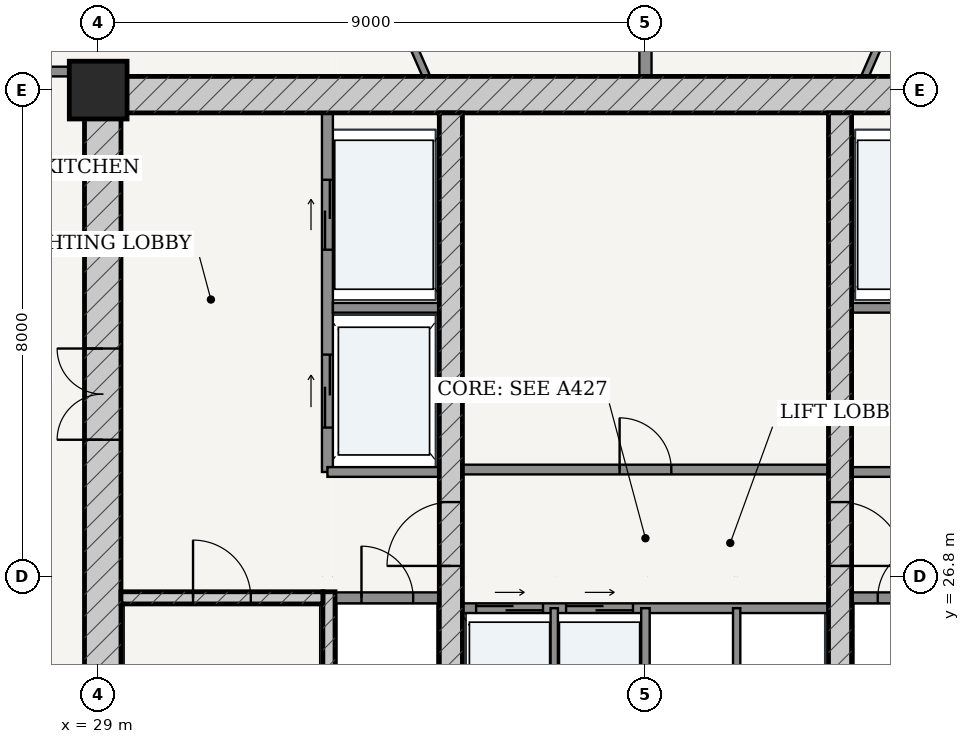
"""IFC4 building model, lengths in metres.
Left out: names, types, materials, properties, quantities, classifications, styles, units other than length and angle.
Written with IfcOpenShell. Run it as: python <this file> out.ifc"""

import sys

from ifc_helpers import new_model, si_unit, direction, frame, frame_2d, origin, origin_2d, place, context, subcontext, project, spatial, rectangle, extrude, source, transform, mapped, element, fill, save


model = new_model("IFC4")
c1 = context("Model", 3, precision=1e-05, world=origin(), true_north=direction((-0.2419218956, 0.970295726276)))
c2 = subcontext(c1, "Body", "Model", "MODEL_VIEW")
j1 = project(units=[si_unit("LENGTHUNIT", "METRE"), si_unit("PLANEANGLEUNIT", "RADIAN")], contexts=[c1])
p1 = place(None, origin())
s1 = spatial("IfcSite", under=j1, at=p1, CompositionType="ELEMENT")
p2 = place(p1, origin())
s2 = spatial("IfcBuilding", under=s1, at=p2, CompositionType="ELEMENT")
p3 = place(p2, frame((0.0, 0.0, 194.9)))
s3 = spatial("IfcBuildingStorey", under=s2, at=p3, CompositionType="ELEMENT", Elevation=194.9)
p4 = place(p3, frame((29.0, 34.8, 0.0), z_axis=(0.0, 0.0, 1.0), x_axis=(1.0, 0.0, 0.0)))
e1 = element("IfcColumn", 1, at=p4, inside=s3, PredefinedType="COLUMN", context=c2, shape_type="SweptSolid", body=[
    extrude(rectangle(XDim=0.95, YDim=0.95, at=origin_2d()), origin(), (0.0, 0.0, 1.0), 3.7),
])
p5 = place(p3, frame((28.775, 34.725, 0.0), z_axis=(0.0, 0.0, 1.0), x_axis=(1.0, 0.0, 0.0)))
e2 = element("IfcWall", 2, at=p5, inside=s3, PredefinedType="SHEAR", context=c2, shape_type="SweptSolid", body=[
    extrude(rectangle(XDim=18.45, YDim=0.6, at=frame_2d((9.225, 0.0))), origin(), (0.0, 0.0, 1.0), 3.435),
])
p6 = place(p3, frame((29.075, 19.175, 0.0), z_axis=(0.0, 0.0, 1.0), x_axis=(0.0, 1.0, 0.0)))
e3 = element("IfcWall", 3, at=p6, inside=s3, PredefinedType="SHEAR", context=c2, shape_type="SweptSolid", body=[
    extrude(rectangle(XDim=15.25, YDim=0.6, at=frame_2d((7.625, 0.0))), origin(), (0.0, 0.0, 1.0), 3.435),
])
p7 = place(p6, frame((9.875, 0.0, 0.0)))
e4 = element("IfcOpeningElement", 4, at=p7, cuts=e3, PredefinedType="OPENING", context=c2, shape_type="SweptSolid", body=[
    extrude(rectangle(XDim=1.5, YDim=2.2, at=frame_2d((0.75, 1.1))), frame((0.0, 0.31, 0.0), z_axis=(0.0, -1.0, 0.0), x_axis=(1.0, 0.0, 0.0)), (0.0, 0.0, 1.0), 0.62),
])
p8 = place(p3, frame((32.795, 19.175, 0.0), z_axis=(0.0, 0.0, 1.0), x_axis=(0.0, 1.0, 0.0)))
e5 = element("IfcWall", 5, at=p8, inside=s3, PredefinedType="SOLIDWALL", context=c2, shape_type="SweptSolid", body=[
    extrude(rectangle(XDim=7.375, YDim=0.2, at=frame_2d((3.688, 0.0))), origin(), (0.0, 0.0, 1.0), 3.435),
])
p9 = place(p3, frame((29.375, 26.45, 0.0), z_axis=(0.0, 0.0, 1.0), x_axis=(1.0, 0.0, 0.0)))
e6 = element("IfcWall", 6, at=p9, inside=s3, PredefinedType="SOLIDWALL", context=c2, shape_type="SweptSolid", body=[
    extrude(rectangle(XDim=3.32, YDim=0.2, at=frame_2d((1.66, 0.0))), origin(), (0.0, 0.0, 1.0), 3.435),
])
p10 = place(p9, frame((1.185, 0.0, 0.0)))
e7 = element("IfcOpeningElement", 7, at=p10, cuts=e6, PredefinedType="OPENING", context=c2, shape_type="SweptSolid", body=[
    extrude(rectangle(XDim=0.95, YDim=2.15, at=frame_2d((0.475, 1.075))), frame((0.0, 0.11, 0.0), z_axis=(0.0, -1.0, 0.0), x_axis=(1.0, 0.0, 0.0)), (0.0, 0.0, 1.0), 0.22),
])
p11 = place(p3, frame((34.8, 19.175, 0.0), z_axis=(0.0, 0.0, 1.0), x_axis=(0.0, 1.0, 0.0)))
e8 = element("IfcWall", 8, at=p11, inside=s3, PredefinedType="SHEAR", context=c2, shape_type="SweptSolid", body=[
    extrude(rectangle(XDim=15.25, YDim=0.38, at=frame_2d((7.625, 0.0))), origin(), (0.0, 0.0, 1.0), 3.435),
])
p12 = place(p11, frame((7.8, 0.0, 0.0)))
e9 = element("IfcOpeningElement", 9, at=p12, cuts=e8, PredefinedType="OPENING", context=c2, shape_type="SweptSolid", body=[
    extrude(rectangle(XDim=1.05, YDim=2.15, at=frame_2d((0.525, 1.075))), frame((0.0, 0.2, 0.0), z_axis=(0.0, -1.0, 0.0), x_axis=(1.0, 0.0, 0.0)), (0.0, 0.0, 1.0), 0.4),
])
p13 = place(p3, frame((41.2, 19.175, 0.0), z_axis=(0.0, 0.0, 1.0), x_axis=(0.0, 1.0, 0.0)))
e10 = element("IfcWall", 10, at=p13, inside=s3, PredefinedType="SHEAR", context=c2, shape_type="SweptSolid", body=[
    extrude(rectangle(XDim=15.25, YDim=0.38, at=frame_2d((7.625, 0.0))), origin(), (0.0, 0.0, 1.0), 3.435),
])
p14 = place(p13, frame((7.8, 0.0, 0.0)))
e11 = element("IfcOpeningElement", 11, at=p14, cuts=e10, PredefinedType="OPENING", context=c2, shape_type="SweptSolid", body=[
    extrude(rectangle(XDim=1.05, YDim=2.15, at=frame_2d((0.525, 1.075))), frame((0.0, 0.2, 0.0), z_axis=(0.0, -1.0, 0.0), x_axis=(1.0, 0.0, 0.0)), (0.0, 0.0, 1.0), 0.4),
])
p15 = place(p3, frame((32.9, 26.45, 0.0), z_axis=(0.0, 0.0, 1.0), x_axis=(1.0, 0.0, 0.0)))
e12 = element("IfcWall", 12, at=p15, inside=s3, PredefinedType="PARTITIONING", context=c2, shape_type="SweptSolid", body=[
    extrude(rectangle(XDim=1.71, YDim=0.18, at=frame_2d((0.855, 0.0))), origin(), (0.0, 0.0, 1.0), 3.435),
])
p16 = place(p15, frame((0.43, 0.0, 0.0)))
e13 = element("IfcOpeningElement", 13, at=p16, cuts=e12, PredefinedType="OPENING", context=c2, shape_type="SweptSolid", body=[
    extrude(rectangle(XDim=0.85, YDim=2.1, at=frame_2d((0.425, 1.05))), frame((0.0, 0.1, 0.0), z_axis=(0.0, -1.0, 0.0), x_axis=(1.0, 0.0, 0.0)), (0.0, 0.0, 1.0), 0.2),
])
p17 = place(p3, frame((41.39, 26.45, 0.0), z_axis=(0.0, 0.0, 1.0), x_axis=(1.0, 0.0, 0.0)))
e14 = element("IfcWall", 14, at=p17, inside=s3, PredefinedType="PARTITIONING", context=c2, shape_type="SweptSolid", body=[
    extrude(rectangle(XDim=1.71, YDim=0.18, at=frame_2d((0.855, 0.0))), origin(), (0.0, 0.0, 1.0), 3.435),
])
p18 = place(p17, frame((0.43, 0.0, 0.0)))
e15 = element("IfcOpeningElement", 15, at=p18, cuts=e14, PredefinedType="OPENING", context=c2, shape_type="SweptSolid", body=[
    extrude(rectangle(XDim=0.85, YDim=2.1, at=frame_2d((0.425, 1.05))), frame((0.0, 0.1, 0.0), z_axis=(0.0, -1.0, 0.0), x_axis=(1.0, 0.0, 0.0)), (0.0, 0.0, 1.0), 0.2),
])
p19 = place(p3, frame((32.77, 28.52, 0.0), z_axis=(0.0, 0.0, 1.0), x_axis=(0.0, 1.0, 0.0)))
e16 = element("IfcWall", 16, at=p19, inside=s3, PredefinedType="PARTITIONING", context=c2, shape_type="SweptSolid", body=[
    extrude(rectangle(XDim=5.905, YDim=0.18, at=frame_2d((2.953, 0.0))), origin(), (0.0, 0.0, 1.0), 3.435),
])
p20 = place(p19, frame((3.655, 0.0, 0.0)))
e17 = element("IfcOpeningElement", 17, at=p20, cuts=e16, PredefinedType="OPENING", context=c2, shape_type="SweptSolid", body=[
    extrude(rectangle(XDim=1.15, YDim=2.2, at=frame_2d((0.575, 1.1))), frame((0.0, 0.1, 0.0), z_axis=(0.0, -1.0, 0.0), x_axis=(1.0, 0.0, 0.0)), (0.0, 0.0, 1.0), 0.2),
])
p21 = place(p19, frame((0.73, 0.0, 0.0)))
e18 = element("IfcOpeningElement", 18, at=p21, cuts=e16, PredefinedType="OPENING", context=c2, shape_type="SweptSolid", body=[
    extrude(rectangle(XDim=1.2, YDim=2.25, at=frame_2d((0.6, 1.125))), frame((0.0, 0.1, 0.0), z_axis=(0.0, -1.0, 0.0), x_axis=(1.0, 0.0, 0.0)), (0.0, 0.0, 1.0), 0.2),
])
p22 = place(p3, frame((32.86, 31.22, 0.0), z_axis=(0.0, 0.0, 1.0), x_axis=(1.0, 0.0, 0.0)))
e19 = element("IfcWall", 19, at=p22, inside=s3, PredefinedType="PARTITIONING", context=c2, shape_type="SweptSolid", body=[
    extrude(rectangle(XDim=1.75, YDim=0.16, at=frame_2d((0.875, 0.0))), origin(), (0.0, 0.0, 1.0), 3.435),
])
p23 = place(p3, frame((32.77, 28.52, 0.0), z_axis=(0.0, 0.0, 1.0), x_axis=(1.0, 0.0, 0.0)))
e20 = element("IfcWall", 20, at=p23, inside=s3, PredefinedType="PARTITIONING", context=c2, shape_type="SweptSolid", body=[
    extrude(rectangle(XDim=1.84, YDim=0.16, at=frame_2d((0.92, 0.0))), origin(), (0.0, 0.0, 1.0), 3.435),
])
p24 = place(p3, frame((41.39, 31.22, 0.0), z_axis=(0.0, 0.0, 1.0), x_axis=(1.0, 0.0, 0.0)))
e21 = element("IfcWall", 21, at=p24, inside=s3, PredefinedType="PARTITIONING", context=c2, shape_type="SweptSolid", body=[
    extrude(rectangle(XDim=1.75, YDim=0.16, at=frame_2d((0.875, 0.0))), origin(), (0.0, 0.0, 1.0), 3.435),
])
p25 = place(p3, frame((41.39, 28.52, 0.0), z_axis=(0.0, 0.0, 1.0), x_axis=(1.0, 0.0, 0.0)))
e22 = element("IfcWall", 22, at=p25, inside=s3, PredefinedType="PARTITIONING", context=c2, shape_type="SweptSolid", body=[
    extrude(rectangle(XDim=1.84, YDim=0.16, at=frame_2d((0.92, 0.0))), origin(), (0.0, 0.0, 1.0), 3.435),
])
p26 = place(p3, frame((34.99, 28.56, 0.0), z_axis=(0.0, 0.0, 1.0), x_axis=(1.0, 0.0, 0.0)))
e23 = element("IfcWall", 23, at=p26, inside=s3, PredefinedType="PARTITIONING", context=c2, shape_type="SweptSolid", body=[
    extrude(rectangle(XDim=6.02, YDim=0.16, at=frame_2d((3.01, 0.0))), origin(), (0.0, 0.0, 1.0), 3.435),
])
p27 = place(p26, frame((2.585, 0.0, 0.0)))
e24 = element("IfcOpeningElement", 24, at=p27, cuts=e23, PredefinedType="OPENING", context=c2, shape_type="SweptSolid", body=[
    extrude(rectangle(XDim=0.85, YDim=2.1, at=frame_2d((0.425, 1.05))), frame((0.0, 0.09, 0.0), z_axis=(0.0, -1.0, 0.0), x_axis=(1.0, 0.0, 0.0)), (0.0, 0.0, 1.0), 0.18),
])
p28 = place(p3, frame((34.99, 26.28, 0.0), z_axis=(0.0, 0.0, 1.0), x_axis=(1.0, 0.0, 0.0)))
e25 = element("IfcWall", 25, at=p28, inside=s3, PredefinedType="PARTITIONING", context=c2, shape_type="SweptSolid", body=[
    extrude(rectangle(XDim=6.02, YDim=0.16, at=frame_2d((3.01, 0.0))), origin(), (0.0, 0.0, 1.0), 3.435),
])
p29 = place(p28, frame((0.225, 0.0, 0.0)))
e26 = element("IfcOpeningElement", 26, at=p29, cuts=e25, PredefinedType="OPENING", context=c2, shape_type="SweptSolid", body=[
    extrude(rectangle(XDim=1.1, YDim=2.2, at=frame_2d((0.55, 1.1))), frame((0.0, 0.09, 0.0), z_axis=(0.0, -1.0, 0.0), x_axis=(1.0, 0.0, 0.0)), (0.0, 0.0, 1.0), 0.18),
])
p30 = place(p28, frame((1.705, 0.0, 0.0)))
e27 = element("IfcOpeningElement", 27, at=p30, cuts=e25, PredefinedType="OPENING", context=c2, shape_type="SweptSolid", body=[
    extrude(rectangle(XDim=1.1, YDim=2.2, at=frame_2d((0.55, 1.1))), frame((0.0, 0.09, 0.0), z_axis=(0.0, -1.0, 0.0), x_axis=(1.0, 0.0, 0.0)), (0.0, 0.0, 1.0), 0.18),
])
p31 = place(p3, frame((36.5, 23.72, 0.0), z_axis=(0.0, 0.0, 1.0), x_axis=(0.0, 1.0, 0.0)))
e28 = element("IfcWall", 28, at=p31, inside=s3, PredefinedType="PARTITIONING", context=c2, shape_type="SweptSolid", body=[
    extrude(rectangle(XDim=2.56, YDim=0.12, at=frame_2d((1.28, 0.0))), origin(), (0.0, 0.0, 1.0), 3.435),
])
p32 = place(p3, frame((38.0, 23.72, 0.0), z_axis=(0.0, 0.0, 1.0), x_axis=(0.0, 1.0, 0.0)))
e29 = element("IfcWall", 29, at=p32, inside=s3, PredefinedType="PARTITIONING", context=c2, shape_type="SweptSolid", body=[
    extrude(rectangle(XDim=2.56, YDim=0.14, at=frame_2d((1.28, 0.0))), origin(), (0.0, 0.0, 1.0), 3.435),
])
p33 = place(p3, frame((39.5, 23.72, 0.0), z_axis=(0.0, 0.0, 1.0), x_axis=(0.0, 1.0, 0.0)))
e30 = element("IfcWall", 30, at=p33, inside=s3, PredefinedType="PARTITIONING", context=c2, shape_type="SweptSolid", body=[
    extrude(rectangle(XDim=2.56, YDim=0.12, at=frame_2d((1.28, 0.0))), origin(), (0.0, 0.0, 1.0), 3.435),
])
p34 = place(p3, frame((26.845, 35.105, 0.0), z_axis=(0.0, 0.0, 1.0), x_axis=(1.0, 0.0, 0.0)))
e31 = element("IfcWall", 31, at=p34, inside=s3, PredefinedType="PARTITIONING", context=c2, shape_type="SweptSolid", body=[
    extrude(rectangle(XDim=1.93, YDim=0.16, at=frame_2d((0.965, 0.0))), origin(), (0.0, 0.0, 1.0), 3.435),
])
p35 = place(p34, frame((0.37, 0.0, 0.0)))
e32 = element("IfcOpeningElement", 32, at=p35, cuts=e31, PredefinedType="OPENING", context=c2, shape_type="SweptSolid", body=[
    extrude(rectangle(XDim=0.98, YDim=2.2, at=frame_2d((0.49, 1.1))), frame((0.0, 0.09, 0.0), z_axis=(0.0, -1.0, 0.0), x_axis=(1.0, 0.0, 0.0)), (0.0, 0.0, 1.0), 0.18),
])
p36 = place(p3, frame((41.61, 35.027, 0.0), z_axis=(0.0, 0.0, 1.0), x_axis=(0.401859508224, 0.915701335398, 0.0)))
e33 = element("IfcWall", 33, at=p36, inside=s3, PredefinedType="PARTITIONING", context=c2, shape_type="SweptSolid", body=[
    extrude(rectangle(XDim=2.83, YDim=0.12, at=frame_2d((1.415, 0.0))), origin(), (0.0, 0.0, 1.0), 3.435),
])
p37 = place(p36, frame((0.965, 0.0, 0.0)))
e34 = element("IfcOpeningElement", 34, at=p37, cuts=e33, PredefinedType="OPENING", context=c2, shape_type="SweptSolid", body=[
    extrude(rectangle(XDim=0.9, YDim=2.15, at=frame_2d((0.45, 1.075))), frame((0.0, 0.07, 0.0), z_axis=(0.0, -1.0, 0.0), x_axis=(1.0, 0.0, 0.0)), (0.0, 0.0, 1.0), 0.14),
])
p38 = place(p3, frame((38.0, 35.027, 0.0), z_axis=(0.0, 0.0, 1.0), x_axis=(0.0, 1.0, 0.0)))
e35 = element("IfcWall", 35, at=p38, inside=s3, PredefinedType="PARTITIONING", context=c2, shape_type="SweptSolid", body=[
    extrude(rectangle(XDim=11.413, YDim=0.2, at=frame_2d((5.707, 0.0))), origin(), (0.0, 0.0, 1.0), 2.52),
])
p39 = place(p3, frame((34.397, 35.027, 0.0), z_axis=(0.0, 0.0, 1.0), x_axis=(-0.401135725485, 0.916018629581, 0.0)))
e36 = element("IfcWall", 36, at=p39, inside=s3, PredefinedType="PARTITIONING", context=c2, shape_type="SweptSolid", body=[
    extrude(rectangle(XDim=2.829, YDim=0.12, at=frame_2d((1.415, 0.0))), origin(), (0.0, 0.0, 1.0), 3.435),
])
p40 = place(p39, frame((0.985, 0.0, 0.0)))
e37 = element("IfcOpeningElement", 37, at=p40, cuts=e36, PredefinedType="OPENING", context=c2, shape_type="SweptSolid", body=[
    extrude(rectangle(XDim=0.86, YDim=2.15, at=frame_2d((0.43, 1.075))), frame((0.0, 0.07, 0.0), z_axis=(0.0, -1.0, 0.0), x_axis=(1.0, 0.0, 0.0)), (0.0, 0.0, 1.0), 0.14),
])
m1 = source(origin(), c2, "Body", "SweptSolid", [
    extrude(rectangle(XDim=1.5, YDim=2.2, at=frame_2d((0.75, 1.1))), frame((0.0, 0.025, 0.0), z_axis=(0.0, -1.0, 0.0), x_axis=(1.0, 0.0, 0.0)), (0.0, 0.0, 1.0), 0.05),
])
p41 = place(p7, origin())
e38 = element("IfcDoor", 38, at=p41, inside=s3, OperationType="DOUBLE_DOOR_SINGLE_SWING", PredefinedType="DOOR", context=c2, shape_type="MappedRepresentation", body=[
    mapped(m1, transform((0.0, 0.0, 0.0), scale=1.0)),
])
fill(e4, e38)
m2 = source(origin(), c2, "Body", "SweptSolid", [
    extrude(rectangle(XDim=1.05, YDim=2.15, at=frame_2d((0.525, 1.075))), frame((0.0, 0.025, 0.0), z_axis=(0.0, -1.0, 0.0), x_axis=(1.0, 0.0, 0.0)), (0.0, 0.0, 1.0), 0.05),
])
p42 = place(p12, origin())
e39 = element("IfcDoor", 39, at=p42, inside=s3, OperationType="SINGLE_SWING_LEFT", PredefinedType="DOOR", context=c2, shape_type="MappedRepresentation", body=[
    mapped(m2, transform((0.0, 0.0, 0.0), scale=1.0)),
])
fill(e9, e39)
p43 = place(p14, frame((1.05, 0.0, 0.0), z_axis=(0.0, 0.0, 1.0), x_axis=(-1.0, 0.0, 0.0)))
e40 = element("IfcDoor", 40, at=p43, inside=s3, OperationType="SINGLE_SWING_RIGHT", PredefinedType="DOOR", context=c2, shape_type="MappedRepresentation", body=[
    mapped(m2, transform((0.0, 0.0, 0.0), scale=1.0)),
])
fill(e11, e40)
m3 = source(origin(), c2, "Body", "SweptSolid", [
    extrude(rectangle(XDim=0.95, YDim=2.15, at=frame_2d((0.475, 1.075))), frame((0.0, 0.025, 0.0), z_axis=(0.0, -1.0, 0.0), x_axis=(1.0, 0.0, 0.0)), (0.0, 0.0, 1.0), 0.05),
])
p44 = place(p10, origin())
e41 = element("IfcDoor", 41, at=p44, inside=s3, OperationType="SINGLE_SWING_LEFT", PredefinedType="DOOR", context=c2, shape_type="MappedRepresentation", body=[
    mapped(m3, transform((0.0, 0.0, 0.0), scale=1.0)),
])
fill(e7, e41)
m4 = source(origin(), c2, "Body", "SweptSolid", [
    extrude(rectangle(XDim=0.85, YDim=2.1, at=frame_2d((0.425, 1.05))), frame((0.0, 0.025, 0.0), z_axis=(0.0, -1.0, 0.0), x_axis=(1.0, 0.0, 0.0)), (0.0, 0.0, 1.0), 0.05),
])
p45 = place(p16, origin())
e42 = element("IfcDoor", 42, at=p45, inside=s3, OperationType="SINGLE_SWING_LEFT", PredefinedType="DOOR", context=c2, shape_type="MappedRepresentation", body=[
    mapped(m4, transform((0.0, 0.0, 0.0), scale=1.0)),
])
fill(e13, e42)
p46 = place(p18, origin())
e43 = element("IfcDoor", 43, at=p46, inside=s3, OperationType="SINGLE_SWING_RIGHT", PredefinedType="DOOR", context=c2, shape_type="MappedRepresentation", body=[
    mapped(m4, transform((0.0, 0.0, 0.0), scale=1.0)),
])
fill(e15, e43)
p47 = place(p27, origin())
e44 = element("IfcDoor", 44, at=p47, inside=s3, OperationType="SINGLE_SWING_LEFT", PredefinedType="DOOR", context=c2, shape_type="MappedRepresentation", body=[
    mapped(m4, transform((0.0, 0.0, 0.0), scale=1.0)),
])
fill(e24, e44)
m5 = source(origin(), c2, "Body", "SweptSolid", [
    extrude(rectangle(XDim=1.15, YDim=2.2, at=frame_2d((0.575, 1.1))), frame((0.0, 0.025, 0.0), z_axis=(0.0, -1.0, 0.0), x_axis=(1.0, 0.0, 0.0)), (0.0, 0.0, 1.0), 0.05),
])
p48 = place(p20, origin())
e45 = element("IfcDoor", 45, at=p48, inside=s3, OperationType="DOUBLE_DOOR_SLIDING", PredefinedType="DOOR", context=c2, shape_type="MappedRepresentation", body=[
    mapped(m5, transform((0.0, 0.0, 0.0), scale=1.0)),
])
fill(e17, e45)
m6 = source(origin(), c2, "Body", "SweptSolid", [
    extrude(rectangle(XDim=1.2, YDim=2.25, at=frame_2d((0.6, 1.125))), frame((0.0, 0.025, 0.0), z_axis=(0.0, -1.0, 0.0), x_axis=(1.0, 0.0, 0.0)), (0.0, 0.0, 1.0), 0.05),
])
p49 = place(p21, origin())
e46 = element("IfcDoor", 46, at=p49, inside=s3, OperationType="DOUBLE_DOOR_SLIDING", PredefinedType="DOOR", context=c2, shape_type="MappedRepresentation", body=[
    mapped(m6, transform((0.0, 0.0, 0.0), scale=1.0)),
])
fill(e18, e46)
m7 = source(origin(), c2, "Body", "SweptSolid", [
    extrude(rectangle(XDim=1.1, YDim=2.2, at=frame_2d((0.55, 1.1))), frame((0.0, 0.025, 0.0), z_axis=(0.0, -1.0, 0.0), x_axis=(1.0, 0.0, 0.0)), (0.0, 0.0, 1.0), 0.05),
])
p50 = place(p29, origin())
e47 = element("IfcDoor", 47, at=p50, inside=s3, OperationType="DOUBLE_DOOR_SLIDING", PredefinedType="DOOR", context=c2, shape_type="MappedRepresentation", body=[
    mapped(m7, transform((0.0, 0.0, 0.0), scale=1.0)),
])
fill(e26, e47)
p51 = place(p30, origin())
e48 = element("IfcDoor", 48, at=p51, inside=s3, OperationType="DOUBLE_DOOR_SLIDING", PredefinedType="DOOR", context=c2, shape_type="MappedRepresentation", body=[
    mapped(m7, transform((0.0, 0.0, 0.0), scale=1.0)),
])
fill(e27, e48)
save(model, sys.argv[1])
